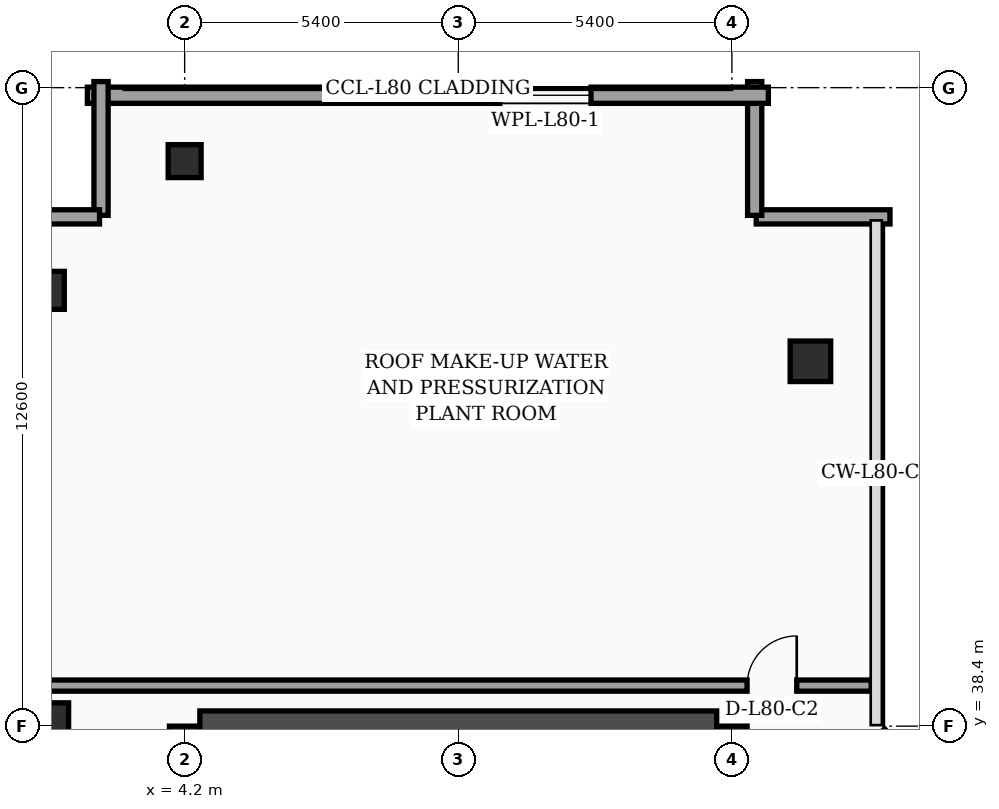
"""IFC4 building model, lengths in metres.
Left out: names, types, materials, properties, quantities, classifications, styles, units other than length and angle.
Written with IfcOpenShell. Run it as: python <this file> out.ifc"""

import sys

from ifc_helpers import new_model, si_unit, direction, frame, frame_2d, origin, origin_2d, place, context, subcontext, project, spatial, rectangle, hollow_rectangle, extrude, element, fill, save


model = new_model("IFC4")
c1 = context("Model", 3, precision=1e-05, world=origin(), true_north=direction((0.0, 1.0)))
c2 = subcontext(c1, "Body", "Model", "MODEL_VIEW")
j1 = project(units=[si_unit("LENGTHUNIT", "METRE"), si_unit("PLANEANGLEUNIT", "RADIAN")], contexts=[c1])
p1 = place(None, origin())
s1 = spatial("IfcSite", under=j1, at=p1, CompositionType="ELEMENT")
p2 = place(p1, origin())
s2 = spatial("IfcBuilding", under=s1, at=p2, CompositionType="ELEMENT")
p3 = place(p2, frame((0.0, 0.0, 325.5)))
s3 = spatial("IfcBuildingStorey", under=s2, at=p3, CompositionType="ELEMENT", Elevation=325.5)
p4 = place(p3, frame((4.2, 16.8, 0.0), z_axis=(0.0, 0.0, 1.0), x_axis=(0.0, 1.0, 0.0)))
e1 = element("IfcWall", 1, at=p4, inside=s3, PredefinedType="SHEAR", context=c2, shape_type="SweptSolid", body=[
    extrude(rectangle(XDim=21.6, YDim=0.6, at=frame_2d((10.8, 0.0))), origin(), (0.0, 0.0, 1.0), 4.76),
])
p5 = place(p3, frame((15.0, 16.8, 0.0), z_axis=(0.0, 0.0, 1.0), x_axis=(0.0, 1.0, 0.0)))
e2 = element("IfcWall", 2, at=p5, inside=s3, PredefinedType="SHEAR", context=c2, shape_type="SweptSolid", body=[
    extrude(rectangle(XDim=21.6, YDim=0.6, at=frame_2d((10.8, 0.0))), origin(), (0.0, 0.0, 1.0), 4.76),
])
p6 = place(p5, frame((8.65, 0.0, 0.0)))
e3 = element("IfcOpeningElement", 3, at=p6, cuts=e2, PredefinedType="OPENING", context=c2, shape_type="SweptSolid", body=[
    extrude(rectangle(XDim=1.1, YDim=2.2, at=frame_2d((0.55, 1.1))), frame((0.0, 0.31, 0.0), z_axis=(0.0, -1.0, 0.0), x_axis=(1.0, 0.0, 0.0)), (0.0, 0.0, 1.0), 0.62),
])
p7 = place(p3, frame((4.5, 38.4, 0.0), z_axis=(0.0, 0.0, 1.0), x_axis=(1.0, 0.0, 0.0)))
e4 = element("IfcWall", 4, at=p7, inside=s3, PredefinedType="SHEAR", context=c2, shape_type="SweptSolid", body=[
    extrude(rectangle(XDim=10.2, YDim=0.6, at=frame_2d((5.1, 0.0))), origin(), (0.0, 0.0, 1.0), 4.76),
])
p8 = place(p3, frame((1.45, 38.4, 0.0), z_axis=(0.0, 0.0, 1.0), x_axis=(1.0, 0.0, 0.0)))
e5 = element("IfcColumn", 5, at=p8, inside=s3, PredefinedType="COLUMN", context=c2, shape_type="SweptSolid", body=[
    extrude(rectangle(XDim=0.92, YDim=0.92, at=origin_2d()), origin(), (0.0, 0.0, 1.0), 4.76),
])
p9 = place(p3, frame((1.45, 47.0, 0.0), z_axis=(0.0, 0.0, 1.0), x_axis=(1.0, 0.0, 0.0)))
e6 = element("IfcColumn", 6, at=p9, inside=s3, PredefinedType="COLUMN", context=c2, shape_type="SweptSolid", body=[
    extrude(hollow_rectangle(XDim=0.75, YDim=0.75, WallThickness=0.032, at=origin_2d()), origin(), (0.0, 0.0, 1.0), 4.76),
])
p10 = place(p3, frame((4.2, 49.55, 0.0), z_axis=(0.0, 0.0, 1.0), x_axis=(1.0, 0.0, 0.0)))
e7 = element("IfcColumn", 7, at=p10, inside=s3, PredefinedType="COLUMN", context=c2, shape_type="SweptSolid", body=[
    extrude(hollow_rectangle(XDim=0.65, YDim=0.65, WallThickness=0.028, at=origin_2d()), origin(), (0.0, 0.0, 1.0), 4.76),
])
p11 = place(p3, frame((16.55, 45.6, 0.0), z_axis=(0.0, 0.0, 1.0), x_axis=(1.0, 0.0, 0.0)))
e8 = element("IfcColumn", 8, at=p11, inside=s3, PredefinedType="COLUMN", context=c2, shape_type="SweptSolid", body=[
    extrude(rectangle(XDim=0.8, YDim=0.8, at=origin_2d()), origin(), (0.0, 0.0, 1.0), 4.76),
])
for number, where, z_axis, x_axis in (
    (9, (18.12, 48.45, 0.0), (0.0, 0.0, 1.0), (-1.0, 0.0, 0.0)),
    (10, (15.45, 48.48, 0.0), (0.0, 0.0, 1.0), (0.0, 1.0, 0.0)),
):
    element("IfcWall", number, at=place(p3, frame(where, z_axis=z_axis, x_axis=x_axis)), inside=s3, PredefinedType="SOLIDWALL", context=c2, shape_type="SweptSolid", body=[
        extrude(rectangle(XDim=2.64, YDim=0.28, at=frame_2d((1.32, 0.0))), origin(), (0.0, 0.0, 1.0), 4.76),
    ])
p12 = place(p3, frame((15.72, 50.85, 0.0), z_axis=(0.0, 0.0, 1.0), x_axis=(-1.0, 0.0, 0.0)))
e11 = element("IfcWall", 11, at=p12, inside=s3, PredefinedType="SOLIDWALL", context=c2, shape_type="SweptSolid", body=[
    extrude(rectangle(XDim=13.44, YDim=0.32, at=frame_2d((6.72, 0.0))), origin(), (0.0, 0.0, 1.0), 4.76),
])
p13 = place(p12, frame((3.5, 0.0, 1.1)))
e12 = element("IfcOpeningElement", 12, at=p13, cuts=e11, PredefinedType="OPENING", context=c2, shape_type="SweptSolid", body=[
    extrude(rectangle(XDim=1.8, YDim=1.5, at=frame_2d((0.9, 0.75))), frame((0.0, 0.17, 0.0), z_axis=(0.0, -1.0, 0.0), x_axis=(1.0, 0.0, 0.0)), (0.0, 0.0, 1.0), 0.34),
])
for number, where, z_axis, x_axis in (
    (13, (2.55, 51.12, 0.0), (0.0, 0.0, 1.0), (0.0, -1.0, 0.0)),
    (14, (2.52, 48.45, 0.0), (0.0, 0.0, 1.0), (-1.0, 0.0, 0.0)),
):
    element("IfcWall", number, at=place(p3, frame(where, z_axis=z_axis, x_axis=x_axis)), inside=s3, PredefinedType="SOLIDWALL", context=c2, shape_type="SweptSolid", body=[
        extrude(rectangle(XDim=2.64, YDim=0.28, at=frame_2d((1.32, 0.0))), origin(), (0.0, 0.0, 1.0), 4.76),
    ])
p14 = place(p3, frame((0.08, 39.2, 0.0), z_axis=(0.0, 0.0, 1.0), x_axis=(1.0, 0.0, 0.0)))
e15 = element("IfcWall", 15, at=p14, inside=s3, PredefinedType="SOLIDWALL", context=c2, shape_type="SweptSolid", body=[
    extrude(rectangle(XDim=17.67, YDim=0.22, at=frame_2d((8.835, 0.0))), origin(), (0.0, 0.0, 1.0), 4.19),
])
p15 = place(p14, frame((15.22, 0.0, 0.0)))
e16 = element("IfcOpeningElement", 16, at=p15, cuts=e15, PredefinedType="OPENING", context=c2, shape_type="SweptSolid", body=[
    extrude(rectangle(XDim=0.98, YDim=2.15, at=frame_2d((0.49, 1.075))), frame((0.0, 0.12, 0.0), z_axis=(0.0, -1.0, 0.0), x_axis=(1.0, 0.0, 0.0)), (0.0, 0.0, 1.0), 0.24),
])
p16 = place(p13, origin())
e17 = element("IfcWindow", 17, at=p16, inside=s3, PartitioningType="SINGLE_PANEL", PredefinedType="WINDOW", context=c2, shape_type="SweptSolid", body=[
    extrude(rectangle(XDim=1.8, YDim=1.5, at=frame_2d((0.9, 0.75))), frame((0.0, 0.03, 0.0), z_axis=(0.0, -1.0, 0.0), x_axis=(1.0, 0.0, 0.0)), (0.0, 0.0, 1.0), 0.06),
])
fill(e12, e17)
p17 = place(p15, origin())
e18 = element("IfcDoor", 18, at=p17, inside=s3, OperationType="SINGLE_SWING_RIGHT", PredefinedType="DOOR", context=c2, shape_type="SweptSolid", body=[
    extrude(rectangle(XDim=0.98, YDim=2.15, at=frame_2d((0.49, 1.075))), frame((0.0, 0.025, 0.0), z_axis=(0.0, -1.0, 0.0), x_axis=(1.0, 0.0, 0.0)), (0.0, 0.0, 1.0), 0.05),
])
fill(e16, e18)
save(model, sys.argv[1])
